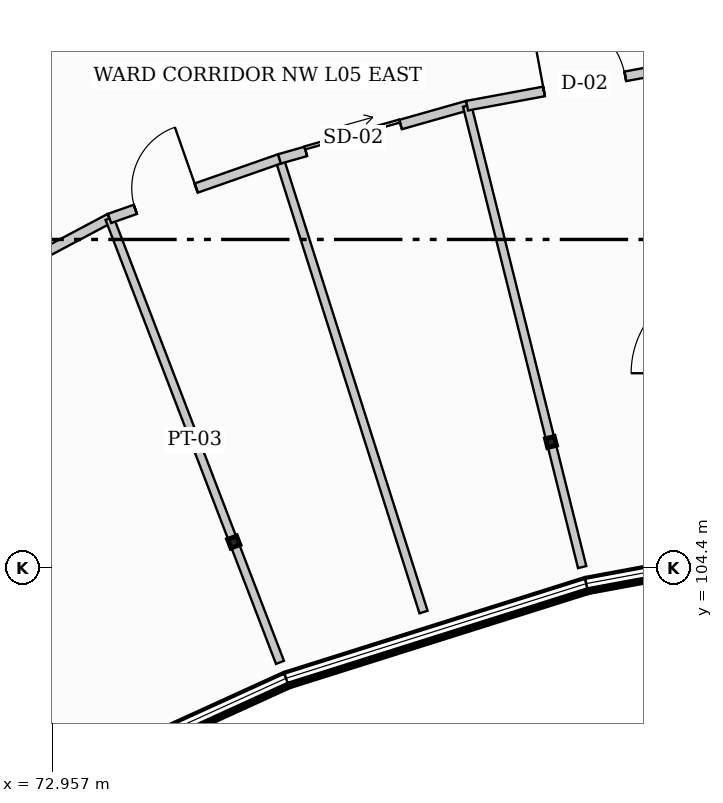
"""IFC4 building model, lengths in metres.
Left out: names, types, materials, properties, quantities, classifications, styles, units other than length and angle.
Written with IfcOpenShell. Run it as: python <this file> out.ifc"""

import sys

from ifc_helpers import new_model, si_unit, direction, frame, frame_2d, origin, origin_2d, place, context, subcontext, project, spatial, rectangle, hollow_rectangle, i_section, extrude, element, fill, save


model = new_model("IFC4")
c1 = context("Model", 3, precision=1e-05, world=origin(), true_north=direction((0.0, 1.0)))
c2 = subcontext(c1, "Body", "Model", "MODEL_VIEW")
j1 = project(units=[si_unit("LENGTHUNIT", "METRE"), si_unit("PLANEANGLEUNIT", "RADIAN")], contexts=[c1])
p1 = place(None, origin())
s1 = spatial("IfcSite", under=j1, at=p1, CompositionType="ELEMENT")
p2 = place(p1, origin())
s2 = spatial("IfcBuilding", under=s1, at=p2, CompositionType="ELEMENT")
p3 = place(p2, frame((0.0, 0.0, 22.2)))
s3 = spatial("IfcBuildingStorey", under=s2, at=p3, CompositionType="ELEMENT", Elevation=22.2)
p4 = place(p3, frame((75.945, 104.824, 0.0), z_axis=(0.0, 0.0, 1.0), x_axis=(-0.358367949545, 0.933580426497, 0.0)))
e1 = element("IfcColumn", 1, at=p4, inside=s3, PredefinedType="COLUMN", context=c2, shape_type="SweptSolid", body=[
    extrude(i_section(OverallWidth=0.153, OverallDepth=0.158, WebThickness=0.007, FlangeThickness=0.01, at=origin_2d()), origin(), (0.0, 0.0, 1.0), 3.9),
])
p5 = place(p3, frame((81.162, 106.469, 0.0), z_axis=(0.0, 0.0, 1.0), x_axis=(-0.2419218956, 0.970295726276, 0.0)))
e2 = element("IfcColumn", 2, at=p5, inside=s3, PredefinedType="COLUMN", context=c2, shape_type="SweptSolid", body=[
    extrude(hollow_rectangle(XDim=0.15, YDim=0.15, WallThickness=0.008, at=origin_2d()), origin(), (0.0, 0.0, 1.0), 3.9),
])
p6 = place(p3, frame((76.805, 102.584, 0.0), z_axis=(0.0, 0.0, 1.0), x_axis=(-0.909955822384, -0.414705198074, 0.0)))
e3 = element("IfcWall", 3, at=p6, inside=s3, PredefinedType="STANDARD", context=c2, shape_type="SweptSolid", body=[
    extrude(rectangle(XDim=5.177, YDim=0.22, at=frame_2d((2.588, 0.0))), origin(), (0.0, 0.0, 1.0), 1.05),
])
p7 = place(p3, frame((81.743, 104.141, 0.0), z_axis=(0.0, 0.0, 1.0), x_axis=(-0.953706582316, -0.300738681994, 0.0)))
e4 = element("IfcWall", 4, at=p7, inside=s3, PredefinedType="STANDARD", context=c2, shape_type="SweptSolid", body=[
    extrude(rectangle(XDim=5.178, YDim=0.22, at=frame_2d((2.589, 0.0))), origin(), (0.0, 0.0, 1.0), 1.05),
])
p8 = place(p3, frame((86.833, 105.084, 0.0), z_axis=(0.0, 0.0, 1.0), x_axis=(-0.98327293422, -0.182138235501, 0.0)))
e5 = element("IfcWall", 5, at=p8, inside=s3, PredefinedType="STANDARD", context=c2, shape_type="SweptSolid", body=[
    extrude(rectangle(XDim=5.177, YDim=0.22, at=frame_2d((2.588, 0.0))), origin(), (0.0, 0.0, 1.0), 1.05),
])
p9 = place(p3, frame((70.731, 108.46, 0.0), z_axis=(0.0, 0.0, 1.0), x_axis=(0.882958125757, 0.46945175275, 0.0)))
e6 = element("IfcWall", 6, at=p9, inside=s3, PredefinedType="PARTITIONING", context=c2, shape_type="SweptSolid", body=[
    extrude(rectangle(XDim=3.592, YDim=0.16, at=frame_2d((1.796, 0.0))), origin(), (0.0, 0.0, 1.0), 2.933),
])
p10 = place(p9, frame((1.146, 0.0, 0.0)))
e7 = element("IfcOpeningElement", 7, at=p10, cuts=e6, PredefinedType="OPENING", context=c2, shape_type="SweptSolid", body=[
    extrude(rectangle(XDim=1.02, YDim=2.08, at=frame_2d((0.51, 1.04))), frame((0.0, 0.09, 0.0), z_axis=(0.0, -1.0, 0.0), x_axis=(1.0, 0.0, 0.0)), (0.0, 0.0, 1.0), 0.18),
])
p11 = place(p3, frame((73.902, 110.146, 0.0), z_axis=(0.0, 0.0, 1.0), x_axis=(0.358410014332, -0.933564278251, 0.0)))
e8 = element("IfcWall", 8, at=p11, inside=s3, PredefinedType="PARTITIONING", context=c2, shape_type="SweptSolid", body=[
    extrude(rectangle(XDim=7.821, YDim=0.14, at=frame_2d((3.91, 0.0))), origin(), (0.0, 0.0, 1.0), 2.933),
])
p12 = place(p3, frame((72.827, 112.947, 0.0), z_axis=(0.0, 0.0, 1.0), x_axis=(0.953736183483, 0.30064479426, 0.0)))
e9 = element("IfcWall", 9, at=p12, inside=s3, PredefinedType="PARTITIONING", context=c2, shape_type="SweptSolid", body=[
    extrude(rectangle(XDim=6.532, YDim=0.16, at=frame_2d((3.266, 0.0))), origin(), (0.0, 0.0, 1.0), 2.933),
])
p13 = place(p12, frame((4.632, 0.0, 0.0)))
e10 = element("IfcOpeningElement", 10, at=p13, cuts=e9, PredefinedType="OPENING", context=c2, shape_type="SweptSolid", body=[
    extrude(rectangle(XDim=0.9, YDim=2.1, at=frame_2d((0.45, 1.05))), frame((0.0, 0.09, 0.0), z_axis=(0.0, -1.0, 0.0), x_axis=(1.0, 0.0, 0.0)), (0.0, 0.0, 1.0), 0.18),
])
p14 = place(p3, frame((76.697, 111.125, 0.0), z_axis=(0.0, 0.0, 1.0), x_axis=(0.302952343331, -0.95300570705, 0.0)))
e11 = element("IfcWall", 11, at=p14, inside=s3, PredefinedType="PARTITIONING", context=c2, shape_type="SweptSolid", body=[
    extrude(rectangle(XDim=7.819, YDim=0.14, at=frame_2d((3.91, 0.0))), origin(), (0.0, 0.0, 1.0), 3.241),
])
p15 = place(p3, frame((73.902, 110.146, 0.0), z_axis=(0.0, 0.0, 1.0), x_axis=(0.943776070457, 0.330585433485, 0.0)))
e12 = element("IfcWall", 12, at=p15, inside=s3, PredefinedType="PARTITIONING", context=c2, shape_type="SweptSolid", body=[
    extrude(rectangle(XDim=2.961, YDim=0.16, at=frame_2d((1.481, 0.0))), origin(), (0.0, 0.0, 1.0), 2.933),
])
p16 = place(p15, frame((0.45, 0.0, 0.0)))
e13 = element("IfcOpeningElement", 13, at=p16, cuts=e12, PredefinedType="OPENING", context=c2, shape_type="SweptSolid", body=[
    extrude(rectangle(XDim=1.06, YDim=2.1, at=frame_2d((0.53, 1.05))), frame((0.0, 0.09, 0.0), z_axis=(0.0, -1.0, 0.0), x_axis=(1.0, 0.0, 0.0)), (0.0, 0.0, 1.0), 0.18),
])
p17 = place(p3, frame((76.697, 111.125, 0.0), z_axis=(0.0, 0.0, 1.0), x_axis=(0.962073473599, 0.272790453274, 0.0)))
e14 = element("IfcWall", 14, at=p17, inside=s3, PredefinedType="PARTITIONING", context=c2, shape_type="SweptSolid", body=[
    extrude(rectangle(XDim=3.208, YDim=0.16, at=frame_2d((1.604, 0.0))), origin(), (0.0, 0.0, 1.0), 2.938),
])
p18 = place(p17, frame((0.45, 0.0, 0.0)))
e15 = element("IfcOpeningElement", 15, at=p18, cuts=e14, PredefinedType="OPENING", context=c2, shape_type="SweptSolid", body=[
    extrude(rectangle(XDim=1.62, YDim=2.3, at=frame_2d((0.81, 1.15))), frame((0.0, 0.09, 0.0), z_axis=(0.0, -1.0, 0.0), x_axis=(1.0, 0.0, 0.0)), (0.0, 0.0, 1.0), 0.18),
])
p19 = place(p3, frame((79.783, 112.0, 0.0), z_axis=(0.0, 0.0, 1.0), x_axis=(0.241947927131, -0.970289235515, 0.0)))
e16 = element("IfcWall", 16, at=p19, inside=s3, PredefinedType="PARTITIONING", context=c2, shape_type="SweptSolid", body=[
    extrude(rectangle(XDim=7.82, YDim=0.14, at=frame_2d((3.91, 0.0))), origin(), (0.0, 0.0, 1.0), 2.938),
])
p20 = place(p3, frame((79.783, 112.0, 0.0), z_axis=(0.0, 0.0, 1.0), x_axis=(0.983234305922, 0.182346646962, 0.0)))
e17 = element("IfcWall", 17, at=p20, inside=s3, PredefinedType="PARTITIONING", context=c2, shape_type="SweptSolid", body=[
    extrude(rectangle(XDim=3.872, YDim=0.16, at=frame_2d((1.936, 0.0))), origin(), (0.0, 0.0, 1.0), 2.938),
])
p21 = place(p20, frame((1.286, 0.0, 0.0)))
e18 = element("IfcOpeningElement", 18, at=p21, cuts=e17, PredefinedType="OPENING", context=c2, shape_type="SweptSolid", body=[
    extrude(rectangle(XDim=1.36, YDim=2.18, at=frame_2d((0.68, 1.09))), frame((0.0, 0.09, 0.0), z_axis=(0.0, -1.0, 0.0), x_axis=(1.0, 0.0, 0.0)), (0.0, 0.0, 1.0), 0.18),
])
p22 = place(p16, origin())
e19 = element("IfcDoor", 19, at=p22, inside=s3, OperationType="SINGLE_SWING_RIGHT", PredefinedType="DOOR", context=c2, shape_type="SweptSolid", body=[
    extrude(rectangle(XDim=1.06, YDim=2.1, at=frame_2d((0.53, 1.05))), frame((0.0, 0.025, 0.0), z_axis=(0.0, -1.0, 0.0), x_axis=(1.0, 0.0, 0.0)), (0.0, 0.0, 1.0), 0.05),
])
fill(e13, e19)
p23 = place(p18, origin())
e20 = element("IfcDoor", 20, at=p23, inside=s3, OperationType="SLIDING_TO_RIGHT", PredefinedType="DOOR", context=c2, shape_type="SweptSolid", body=[
    extrude(rectangle(XDim=1.62, YDim=2.3, at=frame_2d((0.81, 1.15))), frame((0.0, 0.025, 0.0), z_axis=(0.0, -1.0, 0.0), x_axis=(1.0, 0.0, 0.0)), (0.0, 0.0, 1.0), 0.05),
])
fill(e15, e20)
p24 = place(p21, origin())
e21 = element("IfcDoor", 21, at=p24, inside=s3, OperationType="SINGLE_SWING_LEFT", PredefinedType="DOOR", context=c2, shape_type="SweptSolid", body=[
    extrude(rectangle(XDim=1.36, YDim=2.18, at=frame_2d((0.68, 1.09))), frame((0.0, 0.025, 0.0), z_axis=(0.0, -1.0, 0.0), x_axis=(1.0, 0.0, 0.0)), (0.0, 0.0, 1.0), 0.05),
])
fill(e18, e21)
save(model, sys.argv[1])
